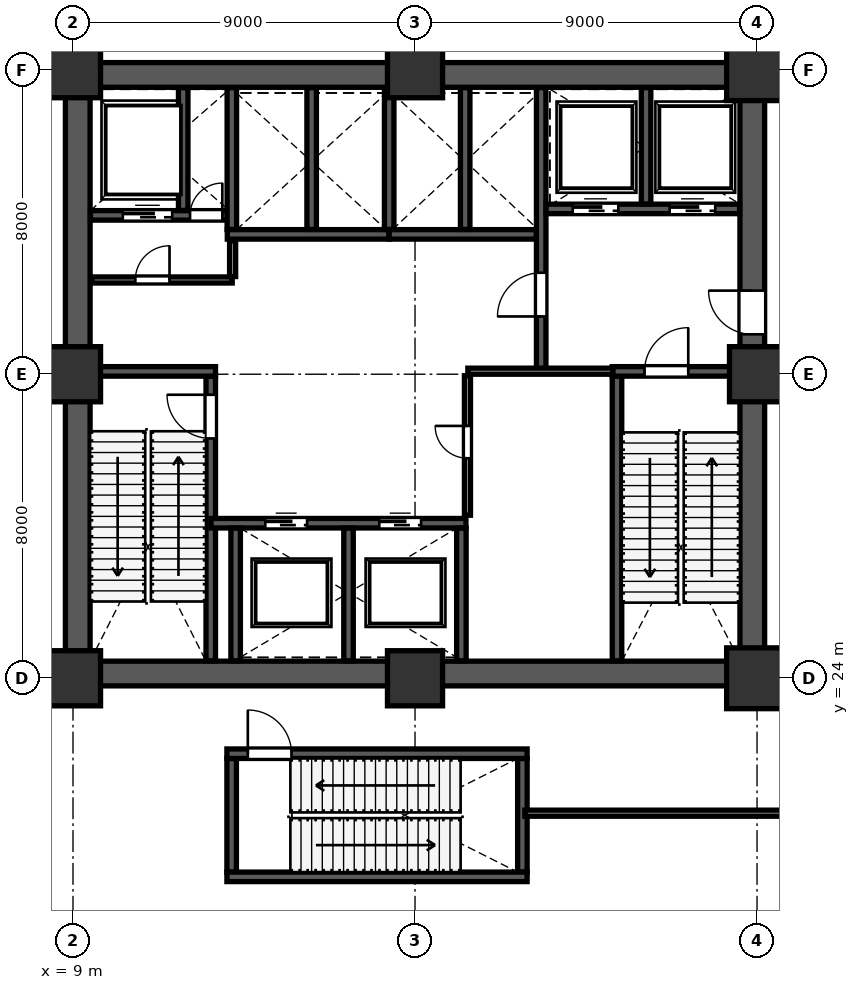
"""IFC4 building model, lengths in metres.
Left out: names, types, materials, properties, quantities, classifications, styles, units other than length and angle.
Written with IfcOpenShell. Run it as: python <this file> out.ifc"""

import sys

from ifc_helpers import new_model, si_unit, direction, frame, frame_2d, origin, origin_2d, place, context, subcontext, project, spatial, rectangle, extrude, source, transform, mapped, element, fill, save


model = new_model("IFC4")
c1 = context("Model", 3, precision=1e-05, world=origin(), true_north=direction((0.0, 1.0)))
c2 = subcontext(c1, "Body", "Model", "MODEL_VIEW")
j1 = project(units=[si_unit("LENGTHUNIT", "METRE"), si_unit("PLANEANGLEUNIT", "RADIAN")], contexts=[c1])
p1 = place(None, origin())
s1 = spatial("IfcSite", under=j1, at=p1, CompositionType="ELEMENT")
p2 = place(p1, origin())
s2 = spatial("IfcBuilding", under=s1, at=p2, CompositionType="ELEMENT")
p3 = place(p2, frame((0.0, 0.0, 6.0)))
s3 = spatial("IfcBuildingStorey", under=s2, at=p3, CompositionType="ELEMENT", Elevation=6.0)
m1 = source(origin(), c2, "Body", "SweptSolid", [
    extrude(rectangle(XDim=1.45, YDim=1.45, at=origin_2d()), origin(), (0.0, 0.0, 1.0), 5.999),
])
p4 = place(p3, frame((9.0, 24.0, 0.001), z_axis=(0.0, 0.0, 1.0), x_axis=(1.0, 0.0, 0.0)))
e1 = element("IfcColumn", 1, at=p4, inside=s3, PredefinedType="COLUMN", context=c2, shape_type="MappedRepresentation", body=[
    mapped(m1, transform((0.0, 0.0, 0.0), scale=1.0)),
])
m2 = source(origin(), c2, "Body", "SweptSolid", [
    extrude(rectangle(XDim=1.45, YDim=1.45, at=origin_2d()), origin(), (0.0, 0.0, 1.0), 5.999),
])
for number, where, z_axis, x_axis in (
    (2, (9.0, 32.0, 0.001), (0.0, 0.0, 1.0), (1.0, 0.0, 0.0)),
    (3, (9.0, 40.0, 0.001), (0.0, 0.0, 1.0), (1.0, 0.0, 0.0)),
):
    element("IfcColumn", number, at=place(p3, frame(where, z_axis=z_axis, x_axis=x_axis)), inside=s3, PredefinedType="COLUMN", context=c2, shape_type="MappedRepresentation", body=[
        mapped(m2, transform((0.0, 0.0, 0.0), scale=1.0)),
    ])
p5 = place(p3, frame((18.0, 24.0, 0.001), z_axis=(0.0, 0.0, 1.0), x_axis=(1.0, 0.0, 0.0)))
e4 = element("IfcColumn", 4, at=p5, inside=s3, PredefinedType="COLUMN", context=c2, shape_type="MappedRepresentation", body=[
    mapped(m1, transform((0.0, 0.0, 0.0), scale=1.0)),
])
p6 = place(p3, frame((18.0, 40.0, 0.001), z_axis=(0.0, 0.0, 1.0), x_axis=(1.0, 0.0, 0.0)))
e5 = element("IfcColumn", 5, at=p6, inside=s3, PredefinedType="COLUMN", context=c2, shape_type="MappedRepresentation", body=[
    mapped(m2, transform((0.0, 0.0, 0.0), scale=1.0)),
])
m3 = source(origin(), c2, "Body", "SweptSolid", [
    extrude(rectangle(XDim=1.6, YDim=1.6, at=origin_2d()), origin(), (0.0, 0.0, 1.0), 5.999),
])
p7 = place(p3, frame((27.0, 24.0, 0.001), z_axis=(0.0, 0.0, 1.0), x_axis=(1.0, 0.0, 0.0)))
e6 = element("IfcColumn", 6, at=p7, inside=s3, PredefinedType="COLUMN", context=c2, shape_type="MappedRepresentation", body=[
    mapped(m3, transform((0.0, 0.0, 0.0), scale=1.0)),
])
p8 = place(p3, frame((27.0, 32.0, 0.001), z_axis=(0.0, 0.0, 1.0), x_axis=(1.0, 0.0, 0.0)))
e7 = element("IfcColumn", 7, at=p8, inside=s3, PredefinedType="COLUMN", context=c2, shape_type="MappedRepresentation", body=[
    mapped(m2, transform((0.0, 0.0, 0.0), scale=1.0)),
])
m4 = source(origin(), c2, "Body", "SweptSolid", [
    extrude(rectangle(XDim=1.6, YDim=1.6, at=origin_2d()), origin(), (0.0, 0.0, 1.0), 5.999),
])
p9 = place(p3, frame((27.0, 40.0, 0.001), z_axis=(0.0, 0.0, 1.0), x_axis=(1.0, 0.0, 0.0)))
e8 = element("IfcColumn", 8, at=p9, inside=s3, PredefinedType="COLUMN", context=c2, shape_type="MappedRepresentation", body=[
    mapped(m4, transform((0.0, 0.0, 0.0), scale=1.0)),
])
p10 = place(p3, frame((9.125, 24.45, 0.0), z_axis=(0.0, 0.0, 1.0), x_axis=(0.0, 1.0, 0.0)))
e9 = element("IfcWall", 9, at=p10, inside=s3, PredefinedType="SHEAR", context=c2, shape_type="SweptSolid", body=[
    extrude(rectangle(XDim=15.1, YDim=0.65, at=frame_2d((7.55, 0.0))), origin(), (0.0, 0.0, 1.0), 5.74),
])
p11 = place(p3, frame((26.875, 24.45, 0.0), z_axis=(0.0, 0.0, 1.0), x_axis=(0.0, 1.0, 0.0)))
e10 = element("IfcWall", 10, at=p11, inside=s3, PredefinedType="SHEAR", context=c2, shape_type="SweptSolid", body=[
    extrude(rectangle(XDim=15.1, YDim=0.65, at=frame_2d((7.55, 0.0))), origin(), (0.0, 0.0, 1.0), 5.74),
])
p12 = place(p11, frame((8.6, 0.0, 0.0)))
e11 = element("IfcOpeningElement", 11, at=p12, cuts=e10, PredefinedType="OPENING", context=c2, shape_type="SweptSolid", body=[
    extrude(rectangle(XDim=1.15, YDim=2.2, at=frame_2d((0.575, 1.1))), frame((0.0, 0.335, 0.0), z_axis=(0.0, -1.0, 0.0), x_axis=(1.0, 0.0, 0.0)), (0.0, 0.0, 1.0), 0.67),
])
for number, where, z_axis, x_axis in (
    (12, (8.8, 24.125, 0.0), (0.0, 0.0, 1.0), (1.0, 0.0, 0.0)),
    (13, (8.8, 39.875, 0.0), (0.0, 0.0, 1.0), (1.0, 0.0, 0.0)),
):
    element("IfcWall", number, at=place(p3, frame(where, z_axis=z_axis, x_axis=x_axis)), inside=s3, PredefinedType="SHEAR", context=c2, shape_type="SweptSolid", body=[
        extrude(rectangle(XDim=18.4, YDim=0.65, at=frame_2d((9.2, 0.0))), origin(), (0.0, 0.0, 1.0), 5.74),
    ])
p13 = place(p3, frame((12.625, 24.46, 0.0), z_axis=(0.0, 0.0, 1.0), x_axis=(0.0, 1.0, 0.0)))
e14 = element("IfcWall", 14, at=p13, inside=s3, PredefinedType="SHEAR", context=c2, shape_type="SweptSolid", body=[
    extrude(rectangle(XDim=7.49, YDim=0.25, at=frame_2d((3.745, 0.0))), origin(), (0.0, 0.0, 1.0), 5.74),
])
p14 = place(p13, frame((5.85, 0.0, 0.0)))
e15 = element("IfcOpeningElement", 15, at=p14, cuts=e14, PredefinedType="OPENING", context=c2, shape_type="SweptSolid", body=[
    extrude(rectangle(XDim=1.15, YDim=2.2, at=frame_2d((0.575, 1.1))), frame((0.0, 0.135, 0.0), z_axis=(0.0, -1.0, 0.0), x_axis=(1.0, 0.0, 0.0)), (0.0, 0.0, 1.0), 0.27),
])
p15 = place(p3, frame((9.46, 32.075, 0.0), z_axis=(0.0, 0.0, 1.0), x_axis=(1.0, 0.0, 0.0)))
e16 = element("IfcWall", 16, at=p15, inside=s3, PredefinedType="SHEAR", context=c2, shape_type="SweptSolid", body=[
    extrude(rectangle(XDim=3.29, YDim=0.25, at=frame_2d((1.645, 0.0))), origin(), (0.0, 0.0, 1.0), 5.74),
])
p16 = place(p3, frame((23.315, 24.46, 0.0), z_axis=(0.0, 0.0, 1.0), x_axis=(0.0, 1.0, 0.0)))
e17 = element("IfcWall", 17, at=p16, inside=s3, PredefinedType="SHEAR", context=c2, shape_type="SweptSolid", body=[
    extrude(rectangle(XDim=7.49, YDim=0.25, at=frame_2d((3.745, 0.0))), origin(), (0.0, 0.0, 1.0), 5.74),
])
p17 = place(p3, frame((23.19, 32.075, 0.0), z_axis=(0.0, 0.0, 1.0), x_axis=(1.0, 0.0, 0.0)))
e18 = element("IfcWall", 18, at=p17, inside=s3, PredefinedType="SHEAR", context=c2, shape_type="SweptSolid", body=[
    extrude(rectangle(XDim=3.35, YDim=0.25, at=frame_2d((1.675, 0.0))), origin(), (0.0, 0.0, 1.0), 5.74),
])
p18 = place(p17, frame((0.85, 0.0, 0.0)))
e19 = element("IfcOpeningElement", 19, at=p18, cuts=e18, PredefinedType="OPENING", context=c2, shape_type="SweptSolid", body=[
    extrude(rectangle(XDim=1.15, YDim=2.2, at=frame_2d((0.575, 1.1))), frame((0.0, 0.135, 0.0), z_axis=(0.0, -1.0, 0.0), x_axis=(1.0, 0.0, 0.0)), (0.0, 0.0, 1.0), 0.27),
])
p19 = place(p3, frame((21.32, 32.12, 0.0), z_axis=(0.0, 0.0, 1.0), x_axis=(0.0, 1.0, 0.0)))
e20 = element("IfcWall", 20, at=p19, inside=s3, PredefinedType="SHEAR", context=c2, shape_type="SweptSolid", body=[
    extrude(rectangle(XDim=7.42, YDim=0.25, at=frame_2d((3.71, 0.0))), origin(), (0.0, 0.0, 1.0), 5.74),
])
p20 = place(p19, frame((1.4, 0.0, 0.0)))
e21 = element("IfcOpeningElement", 21, at=p20, cuts=e20, PredefinedType="OPENING", context=c2, shape_type="SweptSolid", body=[
    extrude(rectangle(XDim=1.15, YDim=2.2, at=frame_2d((0.575, 1.1))), frame((0.0, 0.135, 0.0), z_axis=(0.0, -1.0, 0.0), x_axis=(1.0, 0.0, 0.0)), (0.0, 0.0, 1.0), 0.27),
])
p21 = place(p3, frame((9.46, 36.18, 0.0), z_axis=(0.0, 0.0, 1.0), x_axis=(1.0, 0.0, 0.0)))
e22 = element("IfcWall", 22, at=p21, inside=s3, PredefinedType="SHEAR", context=c2, shape_type="SweptSolid", body=[
    extrude(rectangle(XDim=3.79, YDim=0.25, at=frame_2d((1.895, 0.0))), origin(), (0.0, 0.0, 1.0), 5.74),
])
p22 = place(p21, frame((2.62, 0.0, 0.0)))
e23 = element("IfcOpeningElement", 23, at=p22, cuts=e22, PredefinedType="OPENING", context=c2, shape_type="SweptSolid", body=[
    extrude(rectangle(XDim=0.85, YDim=2.1, at=frame_2d((0.425, 1.05))), frame((0.0, 0.135, 0.0), z_axis=(0.0, -1.0, 0.0), x_axis=(1.0, 0.0, 0.0)), (0.0, 0.0, 1.0), 0.27),
])
p23 = place(p21, frame((0.85, 0.0, 0.0)))
e24 = element("IfcOpeningElement", 24, at=p23, cuts=e22, PredefinedType="OPENING", context=c2, shape_type="SweptSolid", body=[
    extrude(rectangle(XDim=1.3, YDim=2.25, at=frame_2d((0.65, 1.125))), frame((0.0, 0.135, 0.0), z_axis=(0.0, -1.0, 0.0), x_axis=(1.0, 0.0, 0.0)), (0.0, 0.0, 1.0), 0.27),
])
p24 = place(p3, frame((11.9, 36.31, 0.0), z_axis=(0.0, 0.0, 1.0), x_axis=(0.0, 1.0, 0.0)))
e25 = element("IfcWall", 25, at=p24, inside=s3, PredefinedType="SHEAR", context=c2, shape_type="SweptSolid", body=[
    extrude(rectangle(XDim=3.23, YDim=0.25, at=frame_2d((1.615, 0.0))), origin(), (0.0, 0.0, 1.0), 5.74),
])
p25 = place(p3, frame((21.45, 36.35, 0.0), z_axis=(0.0, 0.0, 1.0), x_axis=(1.0, 0.0, 0.0)))
e26 = element("IfcWall", 26, at=p25, inside=s3, PredefinedType="SHEAR", context=c2, shape_type="SweptSolid", body=[
    extrude(rectangle(XDim=5.09, YDim=0.25, at=frame_2d((2.545, 0.0))), origin(), (0.0, 0.0, 1.0), 5.74),
])
p26 = place(p25, frame((0.7, 0.0, 0.0)))
e27 = element("IfcOpeningElement", 27, at=p26, cuts=e26, PredefinedType="OPENING", context=c2, shape_type="SweptSolid", body=[
    extrude(rectangle(XDim=1.2, YDim=2.2, at=frame_2d((0.6, 1.1))), frame((0.0, 0.135, 0.0), z_axis=(0.0, -1.0, 0.0), x_axis=(1.0, 0.0, 0.0)), (0.0, 0.0, 1.0), 0.27),
])
p27 = place(p25, frame((3.25, 0.0, 0.0)))
e28 = element("IfcOpeningElement", 28, at=p27, cuts=e26, PredefinedType="OPENING", context=c2, shape_type="SweptSolid", body=[
    extrude(rectangle(XDim=1.2, YDim=2.2, at=frame_2d((0.6, 1.1))), frame((0.0, 0.135, 0.0), z_axis=(0.0, -1.0, 0.0), x_axis=(1.0, 0.0, 0.0)), (0.0, 0.0, 1.0), 0.27),
])
p28 = place(p3, frame((24.08, 36.48, 0.0), z_axis=(0.0, 0.0, 1.0), x_axis=(0.0, 1.0, 0.0)))
e29 = element("IfcWall", 29, at=p28, inside=s3, PredefinedType="SHEAR", context=c2, shape_type="SweptSolid", body=[
    extrude(rectangle(XDim=3.06, YDim=0.25, at=frame_2d((1.53, 0.0))), origin(), (0.0, 0.0, 1.0), 5.74),
])
p29 = place(p3, frame((12.63, 28.08, 0.0), z_axis=(0.0, 0.0, 1.0), x_axis=(1.0, 0.0, 0.0)))
e30 = element("IfcWall", 30, at=p29, inside=s3, PredefinedType="SHEAR", context=c2, shape_type="SweptSolid", body=[
    extrude(rectangle(XDim=6.71, YDim=0.25, at=frame_2d((3.355, 0.0))), origin(), (0.0, 0.0, 1.0), 5.74),
])
p30 = place(p29, frame((1.43, 0.0, 0.0)))
e31 = element("IfcOpeningElement", 31, at=p30, cuts=e30, PredefinedType="OPENING", context=c2, shape_type="SweptSolid", body=[
    extrude(rectangle(XDim=1.1, YDim=2.2, at=frame_2d((0.55, 1.1))), frame((0.0, 0.135, 0.0), z_axis=(0.0, -1.0, 0.0), x_axis=(1.0, 0.0, 0.0)), (0.0, 0.0, 1.0), 0.27),
])
p31 = place(p29, frame((4.43, 0.0, 0.0)))
e32 = element("IfcOpeningElement", 32, at=p31, cuts=e30, PredefinedType="OPENING", context=c2, shape_type="SweptSolid", body=[
    extrude(rectangle(XDim=1.1, YDim=2.2, at=frame_2d((0.55, 1.1))), frame((0.0, 0.135, 0.0), z_axis=(0.0, -1.0, 0.0), x_axis=(1.0, 0.0, 0.0)), (0.0, 0.0, 1.0), 0.27),
])
for number, where, z_axis, x_axis in (
    (33, (13.28, 24.46, 0.0), (0.0, 0.0, 1.0), (0.0, 1.0, 0.0)),
    (34, (16.25, 24.46, 0.0), (0.0, 0.0, 1.0), (0.0, 1.0, 0.0)),
    (35, (19.22, 24.46, 0.0), (0.0, 0.0, 1.0), (0.0, 1.0, 0.0)),
):
    element("IfcWall", number, at=place(p3, frame(where, z_axis=z_axis, x_axis=x_axis)), inside=s3, PredefinedType="SHEAR", context=c2, shape_type="SweptSolid", body=[
        extrude(rectangle(XDim=3.49, YDim=0.25, at=frame_2d((1.745, 0.0))), origin(), (0.0, 0.0, 1.0), 5.74),
    ])
p32 = place(p3, frame((13.06, 35.68, 0.0), z_axis=(0.0, 0.0, 1.0), x_axis=(1.0, 0.0, 0.0)))
e36 = element("IfcWall", 36, at=p32, inside=s3, PredefinedType="SHEAR", context=c2, shape_type="SweptSolid", body=[
    extrude(rectangle(XDim=4.25, YDim=0.25, at=frame_2d((2.125, 0.0))), origin(), (0.0, 0.0, 1.0), 5.74),
])
for number, where, z_axis, x_axis in (
    (37, (13.18, 35.81, 0.0), (0.0, 0.0, 1.0), (0.0, 1.0, 0.0)),
    (38, (15.28, 35.81, 0.0), (0.0, 0.0, 1.0), (0.0, 1.0, 0.0)),
):
    element("IfcWall", number, at=place(p3, frame(where, z_axis=z_axis, x_axis=x_axis)), inside=s3, PredefinedType="SHEAR", context=c2, shape_type="SweptSolid", body=[
        extrude(rectangle(XDim=3.73, YDim=0.25, at=frame_2d((1.865, 0.0))), origin(), (0.0, 0.0, 1.0), 5.74),
    ])
p33 = place(p3, frame((17.32, 35.68, 0.0), z_axis=(0.0, 0.0, 1.0), x_axis=(1.0, 0.0, 0.0)))
e39 = element("IfcWall", 39, at=p33, inside=s3, PredefinedType="SHEAR", context=c2, shape_type="SweptSolid", body=[
    extrude(rectangle(XDim=3.87, YDim=0.25, at=frame_2d((1.935, 0.0))), origin(), (0.0, 0.0, 1.0), 5.74),
])
for number, where, z_axis, x_axis in (
    (40, (17.32, 35.81, 0.0), (0.0, 0.0, 1.0), (0.0, 1.0, 0.0)),
    (41, (19.32, 35.81, 0.0), (0.0, 0.0, 1.0), (0.0, 1.0, 0.0)),
):
    element("IfcWall", number, at=place(p3, frame(where, z_axis=z_axis, x_axis=x_axis)), inside=s3, PredefinedType="SHEAR", context=c2, shape_type="SweptSolid", body=[
        extrude(rectangle(XDim=3.73, YDim=0.25, at=frame_2d((1.865, 0.0))), origin(), (0.0, 0.0, 1.0), 5.74),
    ])
for number, where, z_axis, x_axis in (
    (42, (13.175, 18.9, 0.0), (0.0, 0.0, 1.0), (0.0, 1.0, 0.0)),
    (43, (20.825, 18.9, 0.0), (0.0, 0.0, 1.0), (0.0, 1.0, 0.0)),
):
    element("IfcWall", number, at=place(p3, frame(where, z_axis=z_axis, x_axis=x_axis)), inside=s3, PredefinedType="SHEAR", context=c2, shape_type="SweptSolid", body=[
        extrude(rectangle(XDim=2.99, YDim=0.25, at=frame_2d((1.495, 0.0))), origin(), (0.0, 0.0, 1.0), 5.74),
    ])
p34 = place(p3, frame((13.05, 18.775, 0.0), z_axis=(0.0, 0.0, 1.0), x_axis=(1.0, 0.0, 0.0)))
e44 = element("IfcWall", 44, at=p34, inside=s3, PredefinedType="SHEAR", context=c2, shape_type="SweptSolid", body=[
    extrude(rectangle(XDim=7.9, YDim=0.25, at=frame_2d((3.95, 0.0))), origin(), (0.0, 0.0, 1.0), 5.74),
])
p35 = place(p3, frame((13.05, 22.015, 0.0), z_axis=(0.0, 0.0, 1.0), x_axis=(1.0, 0.0, 0.0)))
e45 = element("IfcWall", 45, at=p35, inside=s3, PredefinedType="SHEAR", context=c2, shape_type="SweptSolid", body=[
    extrude(rectangle(XDim=7.9, YDim=0.25, at=frame_2d((3.95, 0.0))), origin(), (0.0, 0.0, 1.0), 5.74),
])
p36 = place(p35, frame((0.55, 0.0, 0.0)))
e46 = element("IfcOpeningElement", 46, at=p36, cuts=e45, PredefinedType="OPENING", context=c2, shape_type="SweptSolid", body=[
    extrude(rectangle(XDim=1.15, YDim=2.2, at=frame_2d((0.575, 1.1))), frame((0.0, 0.135, 0.0), z_axis=(0.0, -1.0, 0.0), x_axis=(1.0, 0.0, 0.0)), (0.0, 0.0, 1.0), 0.27),
])
p37 = place(p3, frame((9.49, 34.48, 0.0), z_axis=(0.0, 0.0, 1.0), x_axis=(1.0, 0.0, 0.0)))
e47 = element("IfcWall", 47, at=p37, inside=s3, PredefinedType="PARTITIONING", context=c2, shape_type="SweptSolid", body=[
    extrude(rectangle(XDim=3.7, YDim=0.16, at=frame_2d((1.85, 0.0))), origin(), (0.0, 0.0, 1.0), 5.74),
])
p38 = place(p37, frame((1.15, 0.0, 0.0)))
e48 = element("IfcOpeningElement", 48, at=p38, cuts=e47, PredefinedType="OPENING", context=c2, shape_type="SweptSolid", body=[
    extrude(rectangle(XDim=0.9, YDim=2.15, at=frame_2d((0.45, 1.075))), frame((0.0, 0.09, 0.0), z_axis=(0.0, -1.0, 0.0), x_axis=(1.0, 0.0, 0.0)), (0.0, 0.0, 1.0), 0.18),
])
p39 = place(p3, frame((13.2, 34.57, 0.0), z_axis=(0.0, 0.0, 1.0), x_axis=(0.0, 1.0, 0.0)))
e49 = element("IfcWall", 49, at=p39, inside=s3, PredefinedType="PARTITIONING", context=c2, shape_type="SweptSolid", body=[
    extrude(rectangle(XDim=0.94, YDim=0.16, at=frame_2d((0.47, 0.0))), origin(), (0.0, 0.0, 1.0), 5.74),
])
p40 = place(p3, frame((19.39, 32.08, 0.0), z_axis=(0.0, 0.0, 1.0), x_axis=(1.0, 0.0, 0.0)))
e50 = element("IfcWall", 50, at=p40, inside=s3, PredefinedType="PARTITIONING", context=c2, shape_type="SweptSolid", body=[
    extrude(rectangle(XDim=3.82, YDim=0.16, at=frame_2d((1.91, 0.0))), origin(), (0.0, 0.0, 1.0), 5.74),
])
p41 = place(p3, frame((19.38, 28.29, 0.0), z_axis=(0.0, 0.0, 1.0), x_axis=(0.0, 1.0, 0.0)))
e51 = element("IfcWall", 51, at=p41, inside=s3, PredefinedType="PARTITIONING", context=c2, shape_type="SweptSolid", body=[
    extrude(rectangle(XDim=3.67, YDim=0.16, at=frame_2d((1.835, 0.0))), origin(), (0.0, 0.0, 1.0), 5.74),
])
p42 = place(p41, frame((1.5, 0.0, 0.0)))
e52 = element("IfcOpeningElement", 52, at=p42, cuts=e51, PredefinedType="OPENING", context=c2, shape_type="SweptSolid", body=[
    extrude(rectangle(XDim=0.85, YDim=2.1, at=frame_2d((0.425, 1.05))), frame((0.0, 0.09, 0.0), z_axis=(0.0, -1.0, 0.0), x_axis=(1.0, 0.0, 0.0)), (0.0, 0.0, 1.0), 0.18),
])
p43 = place(p3, frame((20.89, 20.45, 0.0), z_axis=(0.0, 0.0, 1.0), x_axis=(1.0, 0.0, 0.0)))
e53 = element("IfcWall", 53, at=p43, inside=s3, PredefinedType="PARTITIONING", context=c2, shape_type="SweptSolid", body=[
    extrude(rectangle(XDim=27.07, YDim=0.16, at=frame_2d((13.535, 0.0))), origin(), (0.0, 0.0, 1.0), 4.869),
])
p44 = place(p43, frame((10.6, 0.0, 0.0)))
e54 = element("IfcOpeningElement", 54, at=p44, cuts=e53, PredefinedType="OPENING", context=c2, shape_type="SweptSolid", body=[
    extrude(rectangle(XDim=1.1, YDim=2.2, at=frame_2d((0.55, 1.1))), frame((0.0, 0.09, 0.0), z_axis=(0.0, -1.0, 0.0), x_axis=(1.0, 0.0, 0.0)), (0.0, 0.0, 1.0), 0.18),
])
m5 = source(origin(), c2, "Body", "SweptSolid", [
    extrude(rectangle(XDim=1.15, YDim=2.2, at=frame_2d((0.575, 1.1))), frame((0.0, 0.025, 0.0), z_axis=(0.0, -1.0, 0.0), x_axis=(1.0, 0.0, 0.0)), (0.0, 0.0, 1.0), 0.05),
])
p45 = place(p14, origin())
e55 = element("IfcDoor", 55, at=p45, inside=s3, OperationType="SINGLE_SWING_RIGHT", PredefinedType="DOOR", context=c2, shape_type="MappedRepresentation", body=[
    mapped(m5, transform((0.0, 0.0, 0.0), scale=1.0)),
])
fill(e15, e55)
m6 = source(origin(), c2, "Body", "SweptSolid", [
    extrude(rectangle(XDim=1.15, YDim=2.2, at=frame_2d((0.575, 1.1))), frame((0.0, 0.025, 0.0), z_axis=(0.0, -1.0, 0.0), x_axis=(1.0, 0.0, 0.0)), (0.0, 0.0, 1.0), 0.05),
])
p46 = place(p20, origin())
e56 = element("IfcDoor", 56, at=p46, inside=s3, OperationType="SINGLE_SWING_LEFT", PredefinedType="DOOR", context=c2, shape_type="MappedRepresentation", body=[
    mapped(m6, transform((0.0, 0.0, 0.0), scale=1.0)),
])
fill(e21, e56)
p47 = place(p18, origin())
e57 = element("IfcDoor", 57, at=p47, inside=s3, OperationType="SINGLE_SWING_RIGHT", PredefinedType="DOOR", context=c2, shape_type="MappedRepresentation", body=[
    mapped(m5, transform((0.0, 0.0, 0.0), scale=1.0)),
])
fill(e19, e57)
p48 = place(p12, origin())
e58 = element("IfcDoor", 58, at=p48, inside=s3, OperationType="SINGLE_SWING_RIGHT", PredefinedType="DOOR", context=c2, shape_type="MappedRepresentation", body=[
    mapped(m6, transform((0.0, 0.0, 0.0), scale=1.0)),
])
fill(e11, e58)
p49 = place(p36, origin())
e59 = element("IfcDoor", 59, at=p49, inside=s3, OperationType="SINGLE_SWING_LEFT", PredefinedType="DOOR", context=c2, shape_type="MappedRepresentation", body=[
    mapped(m5, transform((0.0, 0.0, 0.0), scale=1.0)),
])
fill(e46, e59)
m7 = source(origin(), c2, "Body", "SweptSolid", [
    extrude(rectangle(XDim=0.85, YDim=2.1, at=frame_2d((0.425, 1.05))), frame((0.0, 0.025, 0.0), z_axis=(0.0, -1.0, 0.0), x_axis=(1.0, 0.0, 0.0)), (0.0, 0.0, 1.0), 0.05),
])
p50 = place(p22, origin())
e60 = element("IfcDoor", 60, at=p50, inside=s3, OperationType="SINGLE_SWING_RIGHT", PredefinedType="DOOR", context=c2, shape_type="MappedRepresentation", body=[
    mapped(m7, transform((0.0, 0.0, 0.0), scale=1.0)),
])
fill(e23, e60)
m8 = source(origin(), c2, "Body", "SweptSolid", [
    extrude(rectangle(XDim=1.1, YDim=2.2, at=frame_2d((0.55, 1.1))), frame((0.0, 0.025, 0.0), z_axis=(0.0, -1.0, 0.0), x_axis=(1.0, 0.0, 0.0)), (0.0, 0.0, 1.0), 0.05),
])
p51 = place(p30, origin())
e61 = element("IfcDoor", 61, at=p51, inside=s3, OperationType="SLIDING_TO_LEFT", PredefinedType="DOOR", context=c2, shape_type="MappedRepresentation", body=[
    mapped(m8, transform((0.0, 0.0, 0.0), scale=1.0)),
])
fill(e31, e61)
p52 = place(p31, origin())
e62 = element("IfcDoor", 62, at=p52, inside=s3, OperationType="SLIDING_TO_RIGHT", PredefinedType="DOOR", context=c2, shape_type="MappedRepresentation", body=[
    mapped(m8, transform((0.0, 0.0, 0.0), scale=1.0)),
])
fill(e32, e62)
m9 = source(origin(), c2, "Body", "SweptSolid", [
    extrude(rectangle(XDim=1.2, YDim=2.2, at=frame_2d((0.6, 1.1))), frame((0.0, 0.025, 0.0), z_axis=(0.0, -1.0, 0.0), x_axis=(1.0, 0.0, 0.0)), (0.0, 0.0, 1.0), 0.05),
])
p53 = place(p26, origin())
e63 = element("IfcDoor", 63, at=p53, inside=s3, OperationType="SLIDING_TO_LEFT", PredefinedType="DOOR", context=c2, shape_type="MappedRepresentation", body=[
    mapped(m9, transform((0.0, 0.0, 0.0), scale=1.0)),
])
fill(e27, e63)
p54 = place(p27, origin())
e64 = element("IfcDoor", 64, at=p54, inside=s3, OperationType="SLIDING_TO_RIGHT", PredefinedType="DOOR", context=c2, shape_type="MappedRepresentation", body=[
    mapped(m9, transform((0.0, 0.0, 0.0), scale=1.0)),
])
fill(e28, e64)
m10 = source(origin(), c2, "Body", "SweptSolid", [
    extrude(rectangle(XDim=1.3, YDim=2.25, at=frame_2d((0.65, 1.125))), frame((0.0, 0.025, 0.0), z_axis=(0.0, -1.0, 0.0), x_axis=(1.0, 0.0, 0.0)), (0.0, 0.0, 1.0), 0.05),
])
p55 = place(p23, origin())
e65 = element("IfcDoor", 65, at=p55, inside=s3, OperationType="SLIDING_TO_LEFT", PredefinedType="DOOR", context=c2, shape_type="MappedRepresentation", body=[
    mapped(m10, transform((0.0, 0.0, 0.0), scale=1.0)),
])
fill(e24, e65)
m11 = source(origin(), c2, "Body", "SweptSolid", [
    extrude(rectangle(XDim=0.9, YDim=2.15, at=frame_2d((0.45, 1.075))), frame((0.0, 0.025, 0.0), z_axis=(0.0, -1.0, 0.0), x_axis=(1.0, 0.0, 0.0)), (0.0, 0.0, 1.0), 0.05),
])
p56 = place(p38, origin())
e66 = element("IfcDoor", 66, at=p56, inside=s3, OperationType="SINGLE_SWING_RIGHT", PredefinedType="DOOR", context=c2, shape_type="MappedRepresentation", body=[
    mapped(m11, transform((0.0, 0.0, 0.0), scale=1.0)),
])
fill(e48, e66)
p57 = place(p42, origin())
e67 = element("IfcDoor", 67, at=p57, inside=s3, OperationType="SINGLE_SWING_RIGHT", PredefinedType="DOOR", context=c2, shape_type="MappedRepresentation", body=[
    mapped(m7, transform((0.0, 0.0, 0.0), scale=1.0)),
])
fill(e52, e67)
save(model, sys.argv[1])
